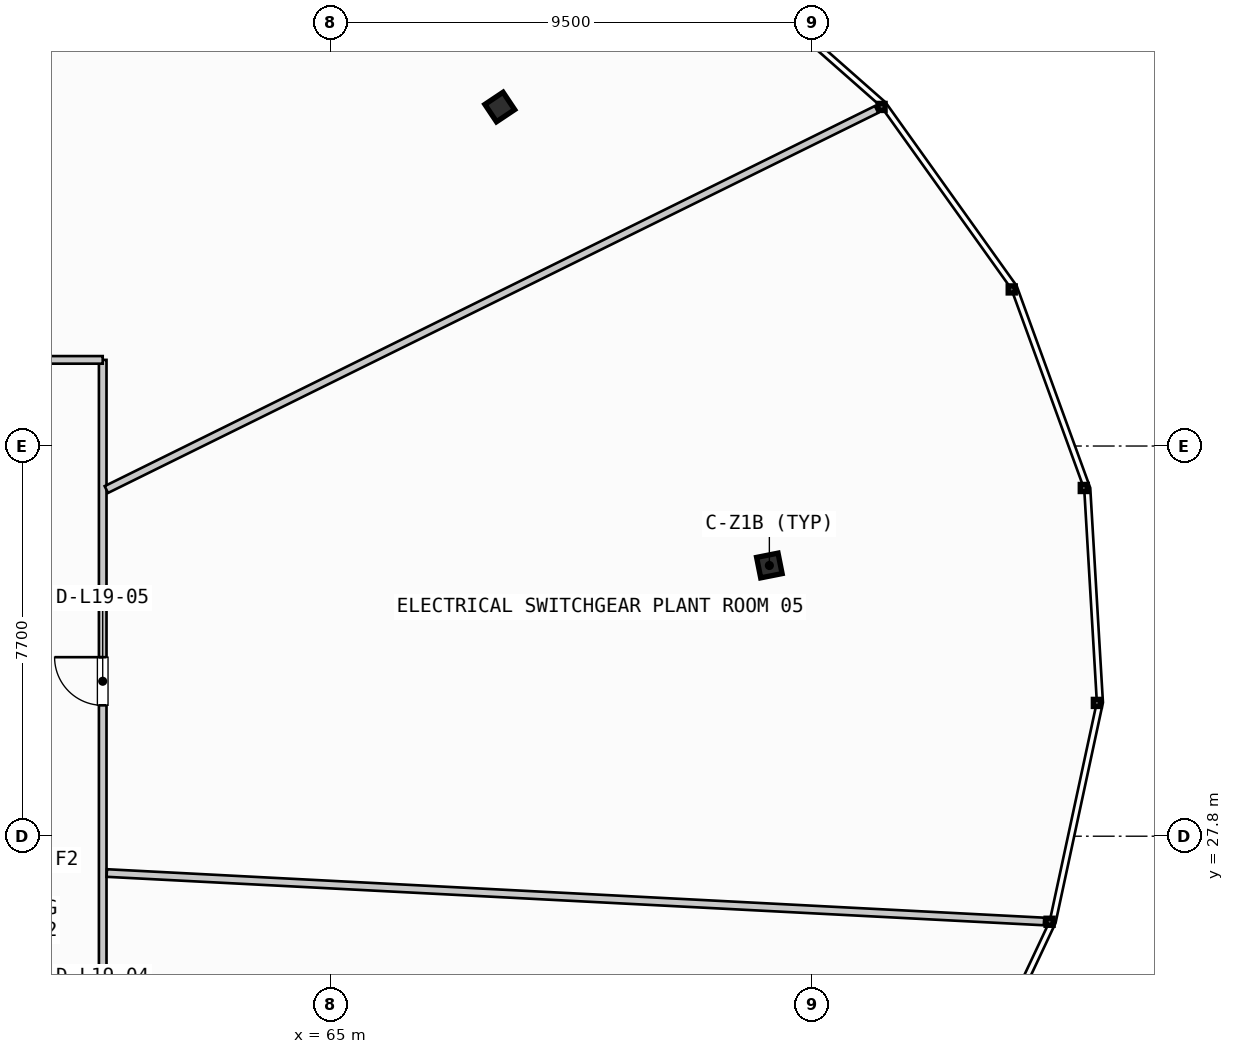
"""IFC4 building model, lengths in metres.
Left out: names, types, materials, properties, quantities, classifications, styles, units other than length and angle.
Written with IfcOpenShell. Run it as: python <this file> out.ifc"""

import sys

from ifc_helpers import new_model, si_unit, direction, frame, frame_2d, origin, origin_2d, place, context, subcontext, project, spatial, rectangle, i_section, extrude, source, transform, mapped, element, fill, save


model = new_model("IFC4")
c1 = context("Model", 3, precision=1e-05, world=origin(), true_north=direction((0.0, 1.0)))
c2 = subcontext(c1, "Body", "Model", "MODEL_VIEW")
j1 = project(units=[si_unit("LENGTHUNIT", "METRE"), si_unit("PLANEANGLEUNIT", "RADIAN")], contexts=[c1])
p1 = place(None, origin())
s1 = spatial("IfcSite", under=j1, at=p1, CompositionType="ELEMENT")
p2 = place(p1, origin())
s2 = spatial("IfcBuilding", under=s1, at=p2, CompositionType="ELEMENT")
p3 = place(p2, frame((0.0, 0.0, 80.4)))
s3 = spatial("IfcBuildingStorey", under=s2, at=p3, CompositionType="ELEMENT", Elevation=80.4)
m1 = source(origin(), c2, "Body", "SweptSolid", [
    extrude(i_section(OverallWidth=0.412, OverallDepth=0.431, WebThickness=0.042, FlangeThickness=0.068, FilletRadius=0.015, at=origin_2d()), origin(), (0.0, 0.0, 1.0), 4.76),
])
for number, where, z_axis, x_axis in (
    (1, (73.657, 33.142, 0.0), (0.0, 0.0, 1.0), (0.981, 0.195, 0.0)),
    (2, (68.336, 42.19, 0.0), (0.0, 0.0, 1.0), (0.831, 0.556, 0.0)),
):
    element("IfcColumn", number, at=place(p3, frame(where, z_axis=z_axis, x_axis=x_axis)), inside=s3, PredefinedType="COLUMN", context=c2, shape_type="MappedRepresentation", body=[
        mapped(m1, transform((0.0, 0.0, 0.0), scale=1.0)),
    ])
p4 = place(p3, frame((60.5, 18.4, 0.0), z_axis=(0.0, 0.0, 1.0), x_axis=(0.0, 1.0, 0.0)))
e3 = element("IfcWall", 3, at=p4, inside=s3, PredefinedType="PARTITIONING", context=c2, shape_type="SweptSolid", body=[
    extrude(rectangle(XDim=18.8, YDim=0.15, at=frame_2d((9.4, 0.0))), origin(), (0.0, 0.0, 1.0), 2.335),
])
p5 = place(p4, frame((4.504, 0.0, 0.0)))
e4 = element("IfcOpeningElement", 4, at=p5, cuts=e3, PredefinedType="OPENING", context=c2, shape_type="SweptSolid", body=[
    extrude(rectangle(XDim=0.95, YDim=2.15, at=frame_2d((0.475, 1.075))), frame((0.0, 0.085, 0.0), z_axis=(0.0, -1.0, 0.0), x_axis=(1.0, 0.0, 0.0)), (0.0, 0.0, 1.0), 0.17),
])
p6 = place(p4, frame((11.983, 0.0, 0.0)))
e5 = element("IfcOpeningElement", 5, at=p6, cuts=e3, PredefinedType="OPENING", context=c2, shape_type="SweptSolid", body=[
    extrude(rectangle(XDim=0.95, YDim=2.15, at=frame_2d((0.475, 1.075))), frame((0.0, 0.085, 0.0), z_axis=(0.0, -1.0, 0.0), x_axis=(1.0, 0.0, 0.0)), (0.0, 0.0, 1.0), 0.17),
])
p7 = place(p3, frame((60.5, 37.2, 0.0), z_axis=(0.0, 0.0, 1.0), x_axis=(-1.0, 0.0, 0.0)))
e6 = element("IfcWall", 6, at=p7, inside=s3, PredefinedType="PARTITIONING", context=c2, shape_type="SweptSolid", body=[
    extrude(rectangle(XDim=27.4, YDim=0.15, at=frame_2d((13.7, 0.0))), origin(), (0.0, 0.0, 1.0), 2.335),
])
p8 = place(p7, frame((3.24, 0.0, 0.0)))
e7 = element("IfcOpeningElement", 7, at=p8, cuts=e6, PredefinedType="OPENING", context=c2, shape_type="SweptSolid", body=[
    extrude(rectangle(XDim=0.95, YDim=2.15, at=frame_2d((0.475, 1.075))), frame((0.0, 0.085, 0.0), z_axis=(0.0, -1.0, 0.0), x_axis=(1.0, 0.0, 0.0)), (0.0, 0.0, 1.0), 0.17),
])
p9 = place(p7, frame((11.856, 0.0, 0.0)))
e8 = element("IfcOpeningElement", 8, at=p9, cuts=e6, PredefinedType="OPENING", context=c2, shape_type="SweptSolid", body=[
    extrude(rectangle(XDim=0.95, YDim=2.15, at=frame_2d((0.475, 1.075))), frame((0.0, 0.085, 0.0), z_axis=(0.0, -1.0, 0.0), x_axis=(1.0, 0.0, 0.0)), (0.0, 0.0, 1.0), 0.17),
])
p10 = place(p7, frame((21.862, 0.0, 0.0)))
e9 = element("IfcOpeningElement", 9, at=p10, cuts=e6, PredefinedType="OPENING", context=c2, shape_type="SweptSolid", body=[
    extrude(rectangle(XDim=0.95, YDim=2.15, at=frame_2d((0.475, 1.075))), frame((0.0, 0.085, 0.0), z_axis=(0.0, -1.0, 0.0), x_axis=(1.0, 0.0, 0.0)), (0.0, 0.0, 1.0), 0.17),
])
p11 = place(p3, frame((60.58, 27.073, 0.0), z_axis=(0.0, 0.0, 1.0), x_axis=(0.998666262496, -0.051630380125, 0.0)))
e10 = element("IfcWall", 10, at=p11, inside=s3, PredefinedType="PARTITIONING", context=c2, shape_type="SweptSolid", body=[
    extrude(rectangle(XDim=18.522, YDim=0.15, at=frame_2d((9.261, 0.0))), origin(), (0.0, 0.0, 1.0), 2.335),
])
p12 = place(p3, frame((60.572, 34.641, 0.0), z_axis=(0.0, 0.0, 1.0), x_axis=(0.896742558372, 0.442552577673, 0.0)))
e11 = element("IfcWall", 11, at=p12, inside=s3, PredefinedType="PARTITIONING", context=c2, shape_type="SweptSolid", body=[
    extrude(rectangle(XDim=16.951, YDim=0.15, at=frame_2d((8.476, 0.0))), origin(), (0.0, 0.0, 1.0), 2.335),
])
p13 = place(p3, frame((53.698, 37.264, 0.0), z_axis=(0.0, 0.0, 1.0), x_axis=(0.591230952175, 0.806502300797, 0.0)))
e12 = element("IfcWall", 12, at=p13, inside=s3, PredefinedType="PARTITIONING", context=c2, shape_type="SweptSolid", body=[
    extrude(rectangle(XDim=15.633, YDim=0.15, at=frame_2d((7.816, 0.0))), origin(), (0.0, 0.0, 1.0), 2.335),
])
m2 = source(origin(), c2, "Body", "SweptSolid", [
    extrude(rectangle(XDim=0.95, YDim=2.15, at=frame_2d((0.475, 1.075))), frame((0.0, 0.025, 0.0), z_axis=(0.0, -1.0, 0.0), x_axis=(1.0, 0.0, 0.0)), (0.0, 0.0, 1.0), 0.05),
])
p14 = place(p6, origin())
e13 = element("IfcDoor", 13, at=p14, inside=s3, OperationType="SINGLE_SWING_RIGHT", PredefinedType="DOOR", context=c2, shape_type="MappedRepresentation", body=[
    mapped(m2, transform((0.0, 0.0, 0.0), scale=1.0)),
])
fill(e5, e13)
save(model, sys.argv[1])
